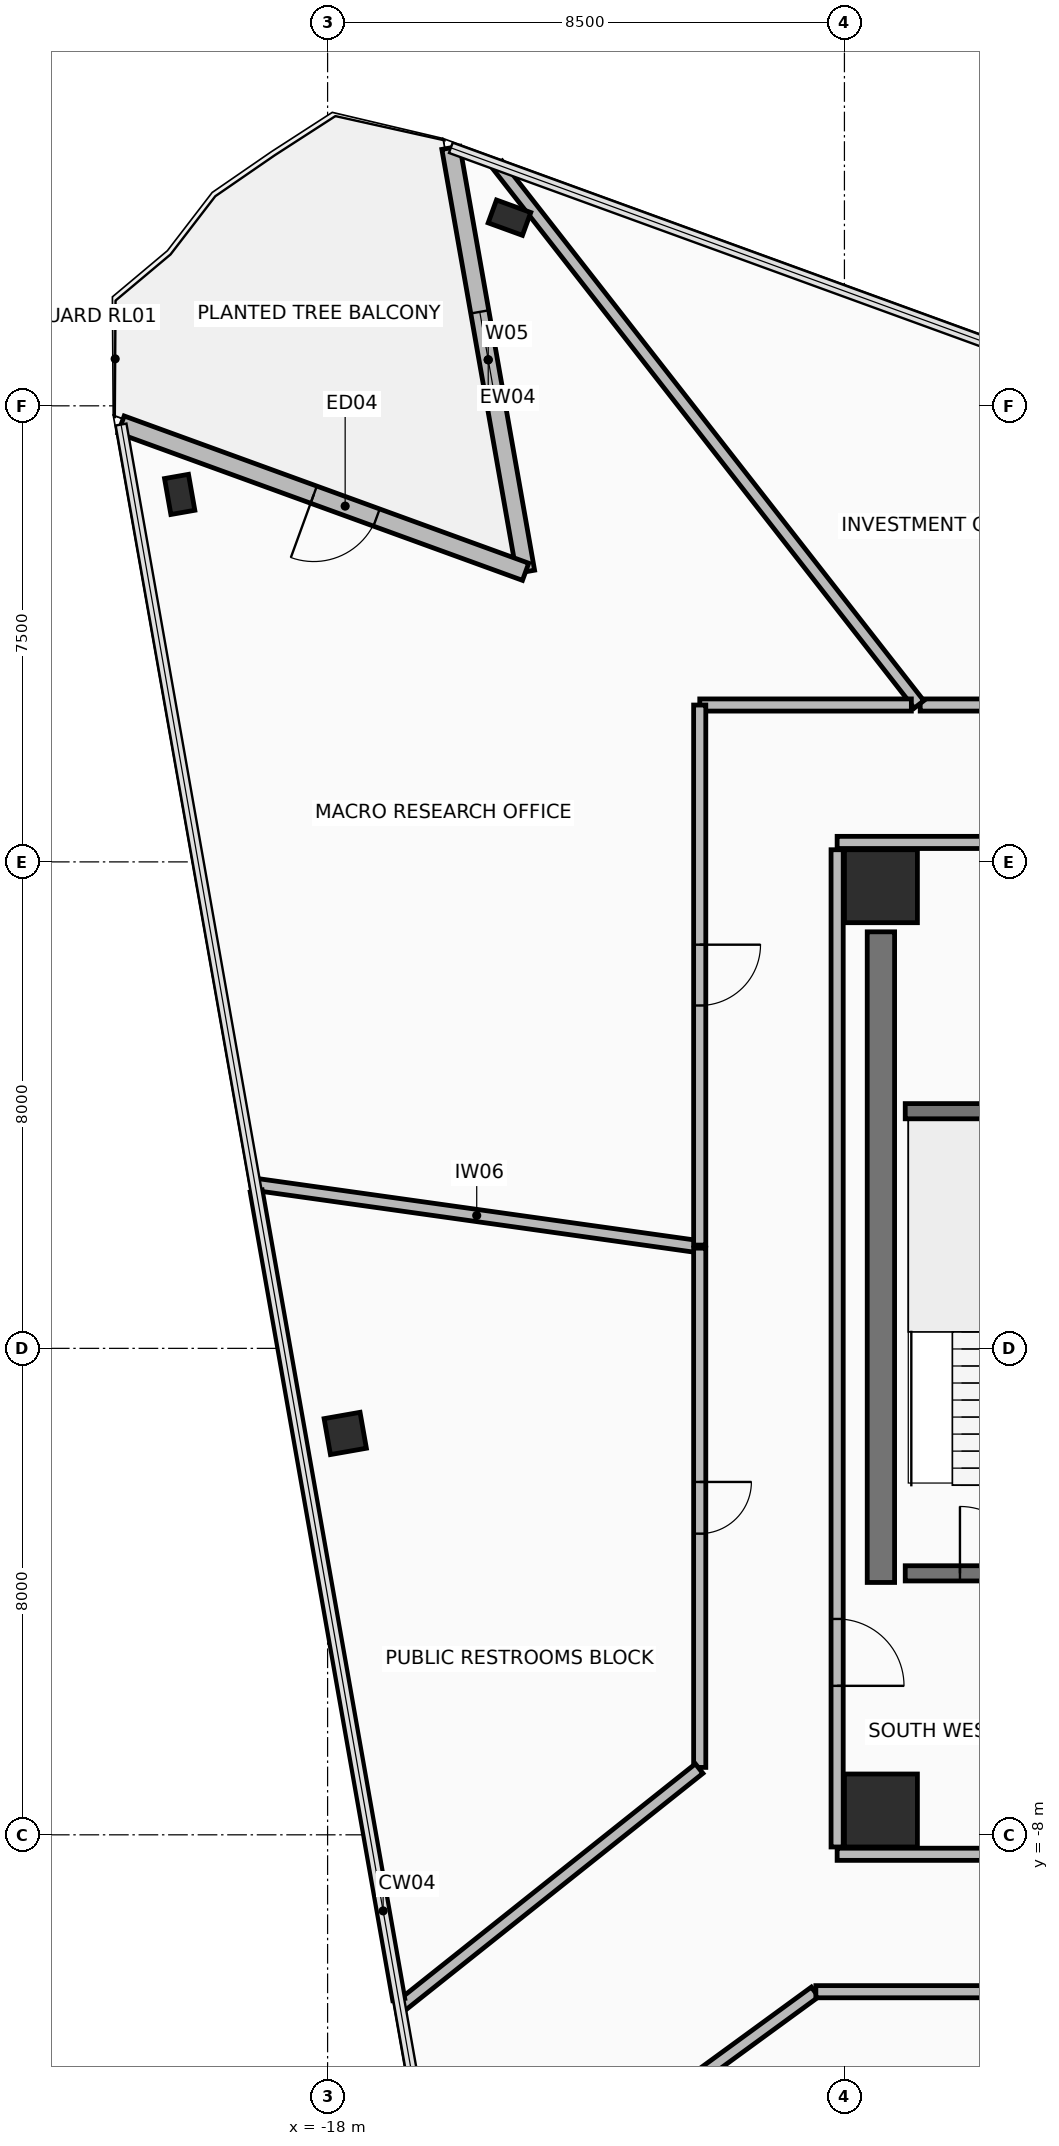
"""IFC4 building model, lengths in metres.
Left out: names, types, materials, properties, quantities, classifications, styles, units other than length and angle.
Written with IfcOpenShell. Run it as: python <this file> out.ifc"""

import sys

from ifc_helpers import new_model, si_unit, direction, frame, frame_2d, origin, origin_2d, place, context, subcontext, project, spatial, rectangle, hollow_rectangle, extrude, element, fill, save


model = new_model("IFC4")
c1 = context("Model", 3, precision=1e-05, world=origin(), true_north=direction((0.0, 1.0)))
c2 = subcontext(c1, "Body", "Model", "MODEL_VIEW")
j1 = project(units=[si_unit("LENGTHUNIT", "METRE"), si_unit("PLANEANGLEUNIT", "RADIAN")], contexts=[c1])
p1 = place(None, origin())
s1 = spatial("IfcSite", under=j1, at=p1, CompositionType="ELEMENT")
p2 = place(p1, origin())
s2 = spatial("IfcBuilding", under=s1, at=p2, CompositionType="ELEMENT")
p3 = place(p2, frame((0.0, 0.0, 170.5)))
s3 = spatial("IfcBuildingStorey", under=s2, at=p3, CompositionType="ELEMENT", Elevation=170.5)
for number, where, z_axis, x_axis in (
    (1, (-8.9, -7.6, 0.0), (0.0, 0.0, 1.0), (1.0, 0.0, 0.0)),
    (2, (-8.9, 7.6, 0.0), (0.0, 0.0, 1.0), (1.0, 0.0, 0.0)),
):
    element("IfcColumn", number, at=place(p3, frame(where, z_axis=z_axis, x_axis=x_axis)), inside=s3, PredefinedType="COLUMN", context=c2, shape_type="SweptSolid", body=[
        extrude(rectangle(XDim=1.2, YDim=1.2, at=origin_2d()), origin(), (0.0, 0.0, 1.0), 3.6),
    ])
p4 = place(p3, frame((-20.433, 14.043, 0.0), z_axis=(0.0, 0.0, 1.0), x_axis=(-0.173648177667, 0.984807753012, 0.0)))
e3 = element("IfcColumn", 3, at=p4, inside=s3, PredefinedType="COLUMN", context=c2, shape_type="SweptSolid", body=[
    extrude(hollow_rectangle(XDim=0.4, YDim=0.6, WallThickness=0.03, at=origin_2d()), origin(), (0.0, 0.0, 1.0), 3.6),
])
p5 = place(p3, frame((-17.71, -1.399, 0.0), z_axis=(0.0, 0.0, 1.0), x_axis=(-0.173648177667, 0.984807753012, 0.0)))
e4 = element("IfcColumn", 4, at=p5, inside=s3, PredefinedType="COLUMN", context=c2, shape_type="SweptSolid", body=[
    extrude(hollow_rectangle(XDim=0.6, YDim=0.6, WallThickness=0.036, at=origin_2d()), origin(), (0.0, 0.0, 1.0), 3.6),
])
p6 = place(p3, frame((-15.009, 18.594, 0.0), z_axis=(0.0, 0.0, 1.0), x_axis=(-0.939692023847, 0.342021783398, 0.0)))
e5 = element("IfcColumn", 5, at=p6, inside=s3, PredefinedType="COLUMN", context=c2, shape_type="SweptSolid", body=[
    extrude(hollow_rectangle(XDim=0.4, YDim=0.6, WallThickness=0.03, at=origin_2d()), origin(), (0.0, 0.0, 1.0), 3.6),
])
p7 = place(p3, frame((-15.973, 19.743, 0.0), z_axis=(0.0, 0.0, 1.0), x_axis=(0.173651569749, -0.984807154891, 0.0)))
e6 = element("IfcWall", 6, at=p7, inside=s3, PredefinedType="STANDARD", context=c2, shape_type="SweptSolid", body=[
    extrude(rectangle(XDim=7.08, YDim=0.3, at=frame_2d((3.54, 0.0))), origin(), (0.0, 0.0, 1.0), 2.715),
])
p8 = place(p7, frame((2.74, 0.0, 0.335)))
e7 = element("IfcOpeningElement", 7, at=p8, cuts=e6, PredefinedType="OPENING", context=c2, shape_type="SweptSolid", body=[
    extrude(rectangle(XDim=1.6, YDim=2.2, at=frame_2d((0.8, 1.1))), frame((0.0, 0.16, 0.0), z_axis=(0.0, -1.0, 0.0), x_axis=(1.0, 0.0, 0.0)), (0.0, 0.0, 1.0), 0.32),
])
p9 = place(p3, frame((-14.744, 12.771, 0.0), z_axis=(0.0, 0.0, 1.0), x_axis=(-0.939687665182, 0.342033758429, 0.0)))
e8 = element("IfcWall", 8, at=p9, inside=s3, PredefinedType="STANDARD", context=c2, shape_type="SweptSolid", body=[
    extrude(rectangle(XDim=7.08, YDim=0.3, at=frame_2d((3.54, 0.0))), origin(), (0.0, 0.0, 1.0), 2.715),
])
p10 = place(p9, frame((2.608, 0.0, 0.0)))
e9 = element("IfcOpeningElement", 9, at=p10, cuts=e8, PredefinedType="OPENING", context=c2, shape_type="SweptSolid", body=[
    extrude(rectangle(XDim=1.1, YDim=2.2, at=frame_2d((0.55, 1.1))), frame((0.0, 0.16, 0.0), z_axis=(0.0, -1.0, 0.0), x_axis=(1.0, 0.0, 0.0)), (0.0, 0.0, 1.0), 0.32),
])
p11 = place(p3, frame((-8.9, -3.85, 0.0), z_axis=(0.0, 0.0, 1.0), x_axis=(0.0, 1.0, 0.0)))
e10 = element("IfcWall", 10, at=p11, inside=s3, PredefinedType="SHEAR", context=c2, shape_type="SweptSolid", body=[
    extrude(rectangle(XDim=10.7, YDim=0.45, at=frame_2d((5.35, 0.0))), origin(), (0.0, 0.0, 1.0), 3.42),
])
p12 = place(p3, frame((-9.62, -8.32, 0.0), z_axis=(0.0, 0.0, 1.0), x_axis=(1.0, 0.0, 0.0)))
e11 = element("IfcWall", 11, at=p12, inside=s3, PredefinedType="PARTITIONING", context=c2, shape_type="SweptSolid", body=[
    extrude(rectangle(XDim=19.24, YDim=0.2, at=frame_2d((9.62, 0.0))), origin(), (0.0, 0.0, 1.0), 2.865),
])
p13 = place(p12, frame((8.57, 0.0, 0.0)))
e12 = element("IfcOpeningElement", 12, at=p13, cuts=e11, PredefinedType="OPENING", context=c2, shape_type="SweptSolid", body=[
    extrude(rectangle(XDim=0.9, YDim=2.1, at=frame_2d((0.45, 1.05))), frame((0.0, 0.11, 0.0), z_axis=(0.0, -1.0, 0.0), x_axis=(1.0, 0.0, 0.0)), (0.0, 0.0, 1.0), 0.22),
])
p14 = place(p12, frame((15.02, 0.0, 0.0)))
e13 = element("IfcOpeningElement", 13, at=p14, cuts=e11, PredefinedType="OPENING", context=c2, shape_type="SweptSolid", body=[
    extrude(rectangle(XDim=0.9, YDim=2.1, at=frame_2d((0.45, 1.05))), frame((0.0, 0.11, 0.0), z_axis=(0.0, -1.0, 0.0), x_axis=(1.0, 0.0, 0.0)), (0.0, 0.0, 1.0), 0.22),
])
p15 = place(p3, frame((9.62, 8.32, 0.0), z_axis=(0.0, 0.0, 1.0), x_axis=(-1.0, 0.0, 0.0)))
e14 = element("IfcWall", 14, at=p15, inside=s3, PredefinedType="PARTITIONING", context=c2, shape_type="SweptSolid", body=[
    extrude(rectangle(XDim=19.24, YDim=0.2, at=frame_2d((9.62, 0.0))), origin(), (0.0, 0.0, 1.0), 2.765),
])
p16 = place(p15, frame((14.22, 0.0, 0.0)))
e15 = element("IfcOpeningElement", 15, at=p16, cuts=e14, PredefinedType="OPENING", context=c2, shape_type="SweptSolid", body=[
    extrude(rectangle(XDim=0.9, YDim=2.1, at=frame_2d((0.45, 1.05))), frame((0.0, 0.11, 0.0), z_axis=(0.0, -1.0, 0.0), x_axis=(1.0, 0.0, 0.0)), (0.0, 0.0, 1.0), 0.22),
])
p17 = place(p3, frame((-9.62, 8.2, 0.0), z_axis=(0.0, 0.0, 1.0), x_axis=(0.0, -1.0, 0.0)))
e16 = element("IfcWall", 16, at=p17, inside=s3, PredefinedType="PARTITIONING", context=c2, shape_type="SweptSolid", body=[
    extrude(rectangle(XDim=16.4, YDim=0.2, at=frame_2d((8.2, 0.0))), origin(), (0.0, 0.0, 1.0), 2.765),
])
p18 = place(p17, frame((12.65, 0.0, 0.0)))
e17 = element("IfcOpeningElement", 17, at=p18, cuts=e16, PredefinedType="OPENING", context=c2, shape_type="SweptSolid", body=[
    extrude(rectangle(XDim=1.1, YDim=2.15, at=frame_2d((0.55, 1.075))), frame((0.0, 0.11, 0.0), z_axis=(0.0, -1.0, 0.0), x_axis=(1.0, 0.0, 0.0)), (0.0, 0.0, 1.0), 0.22),
])
p19 = place(p3, frame((-8.5, -3.7, 0.0), z_axis=(0.0, 0.0, 1.0), x_axis=(1.0, 0.0, 0.0)))
e18 = element("IfcWall", 18, at=p19, inside=s3, PredefinedType="SHEAR", context=c2, shape_type="SweptSolid", body=[
    extrude(rectangle(XDim=2.95, YDim=0.25, at=frame_2d((1.475, 0.0))), origin(), (0.0, 0.0, 1.0), 3.42),
])
p20 = place(p19, frame((0.9, 0.0, 0.0)))
e19 = element("IfcOpeningElement", 19, at=p20, cuts=e18, PredefinedType="OPENING", context=c2, shape_type="SweptSolid", body=[
    extrude(rectangle(XDim=1.1, YDim=2.15, at=frame_2d((0.55, 1.075))), frame((0.0, 0.135, 0.0), z_axis=(0.0, -1.0, 0.0), x_axis=(1.0, 0.0, 0.0)), (0.0, 0.0, 1.0), 0.27),
])
p21 = place(p3, frame((-8.5, 3.9, 0.0), z_axis=(0.0, 0.0, 1.0), x_axis=(1.0, 0.0, 0.0)))
e20 = element("IfcWall", 20, at=p21, inside=s3, PredefinedType="SHEAR", context=c2, shape_type="SweptSolid", body=[
    extrude(rectangle(XDim=2.95, YDim=0.25, at=frame_2d((1.475, 0.0))), origin(), (0.0, 0.0, 1.0), 3.42),
])
p22 = place(p3, frame((-19.194, 2.698, 0.0), z_axis=(0.0, 0.0, 1.0), x_axis=(0.990266577483, -0.139183711406, 0.0)))
e21 = element("IfcWall", 21, at=p22, inside=s3, PredefinedType="PARTITIONING", context=c2, shape_type="SweptSolid", body=[
    extrude(rectangle(XDim=7.364, YDim=0.2, at=frame_2d((3.682, 0.0))), origin(), (0.0, 0.0, 1.0), 2.715),
])
p23 = place(p3, frame((-11.88, 1.648, 0.0), z_axis=(0.0, 0.0, 1.0), x_axis=(0.0, -1.0, 0.0)))
e22 = element("IfcWall", 22, at=p23, inside=s3, PredefinedType="PARTITIONING", context=c2, shape_type="SweptSolid", body=[
    extrude(rectangle(XDim=8.539, YDim=0.2, at=frame_2d((4.27, 0.0))), origin(), (0.0, 0.0, 1.0), 2.865),
])
p24 = place(p23, frame((3.845, 0.0, 0.0)))
e23 = element("IfcOpeningElement", 23, at=p24, cuts=e22, PredefinedType="OPENING", context=c2, shape_type="SweptSolid", body=[
    extrude(rectangle(XDim=0.85, YDim=2.1, at=frame_2d((0.425, 1.05))), frame((0.0, 0.11, 0.0), z_axis=(0.0, -1.0, 0.0), x_axis=(1.0, 0.0, 0.0)), (0.0, 0.0, 1.0), 0.22),
])
p25 = place(p3, frame((-11.889, -6.911, 0.0), z_axis=(0.0, 0.0, 1.0), x_axis=(-0.782381746657, -0.622799167066, 0.0)))
e24 = element("IfcWall", 24, at=p25, inside=s3, PredefinedType="PARTITIONING", context=c2, shape_type="SweptSolid", body=[
    extrude(rectangle(XDim=6.288, YDim=0.2, at=frame_2d((3.144, 0.0))), origin(), (0.0, 0.0, 1.0), 2.715),
])
p26 = place(p3, frame((-16.83, -10.709, 0.0), z_axis=(0.0, 0.0, 1.0), x_axis=(-0.173641964803, 0.984808848487, 0.0)))
e25 = element("IfcWall", 25, at=p26, inside=s3, PredefinedType="PARTITIONING", context=c2, shape_type="SweptSolid", body=[
    extrude(rectangle(XDim=13.503, YDim=0.2, at=frame_2d((6.751, 0.0))), origin(), (0.0, 0.0, 1.0), 3.42),
])
p27 = place(p3, frame((1.09, 10.58, 0.0), z_axis=(0.0, 0.0, 1.0), x_axis=(-1.0, 0.0, 0.0)))
e26 = element("IfcWall", 26, at=p27, inside=s3, PredefinedType="PARTITIONING", context=c2, shape_type="SweptSolid", body=[
    extrude(rectangle(XDim=9.344, YDim=0.2, at=frame_2d((4.672, 0.0))), origin(), (0.0, 0.0, 1.0), 3.055),
])
p28 = place(p27, frame((4.072, 0.0, 0.0)))
e27 = element("IfcOpeningElement", 27, at=p28, cuts=e26, PredefinedType="OPENING", context=c2, shape_type="SweptSolid", body=[
    extrude(rectangle(XDim=1.2, YDim=2.15, at=frame_2d((0.6, 1.075))), frame((0.0, 0.11, 0.0), z_axis=(0.0, -1.0, 0.0), x_axis=(1.0, 0.0, 0.0)), (0.0, 0.0, 1.0), 0.22),
])
p29 = place(p3, frame((-8.273, 10.59, 0.0), z_axis=(0.0, 0.0, 1.0), x_axis=(-0.61567096372, 0.788003340369, 0.0)))
e28 = element("IfcWall", 28, at=p29, inside=s3, PredefinedType="PARTITIONING", context=c2, shape_type="SweptSolid", body=[
    extrude(rectangle(XDim=11.263, YDim=0.2, at=frame_2d((5.631, 0.0))), origin(), (0.0, 0.0, 1.0), 2.715),
])
p30 = place(p3, frame((-8.399, 10.58, 0.0), z_axis=(0.0, 0.0, 1.0), x_axis=(-1.0, 0.0, 0.0)))
e29 = element("IfcWall", 29, at=p30, inside=s3, PredefinedType="PARTITIONING", context=c2, shape_type="SweptSolid", body=[
    extrude(rectangle(XDim=3.48, YDim=0.2, at=frame_2d((1.74, 0.0))), origin(), (0.0, 0.0, 1.0), 2.765),
])
p31 = place(p3, frame((-11.88, 10.579, 0.0), z_axis=(0.0, 0.0, 1.0), x_axis=(0.0, -1.0, 0.0)))
e30 = element("IfcWall", 30, at=p31, inside=s3, PredefinedType="PARTITIONING", context=c2, shape_type="SweptSolid", body=[
    extrude(rectangle(XDim=8.881, YDim=0.2, at=frame_2d((4.44, 0.0))), origin(), (0.0, 0.0, 1.0), 2.765),
])
p32 = place(p31, frame((3.941, 0.0, 0.0)))
e31 = element("IfcOpeningElement", 31, at=p32, cuts=e30, PredefinedType="OPENING", context=c2, shape_type="SweptSolid", body=[
    extrude(rectangle(XDim=1.0, YDim=2.15, at=frame_2d((0.5, 1.075))), frame((0.0, 0.11, 0.0), z_axis=(0.0, -1.0, 0.0), x_axis=(1.0, 0.0, 0.0)), (0.0, 0.0, 1.0), 0.22),
])
p33 = place(p3, frame((-16.069, -15.024, 0.0), z_axis=(0.0, 0.0, 1.0), x_axis=(0.807835167635, 0.589408467815, 0.0)))
e32 = element("IfcWall", 32, at=p33, inside=s3, PredefinedType="PARTITIONING", context=c2, shape_type="SweptSolid", body=[
    extrude(rectangle(XDim=7.531, YDim=0.2, at=frame_2d((3.766, 0.0))), origin(), (0.0, 0.0, 1.0), 2.715),
])
p34 = place(p3, frame((-9.97, -10.58, 0.0), z_axis=(0.0, 0.0, 1.0), x_axis=(1.0, 0.0, 0.0)))
e33 = element("IfcWall", 33, at=p34, inside=s3, PredefinedType="PARTITIONING", context=c2, shape_type="SweptSolid", body=[
    extrude(rectangle(XDim=8.075, YDim=0.2, at=frame_2d((4.037, 0.0))), origin(), (0.0, 0.0, 1.0), 2.865),
])
p35 = place(p34, frame((3.537, 0.0, 0.0)))
e34 = element("IfcOpeningElement", 34, at=p35, cuts=e33, PredefinedType="OPENING", context=c2, shape_type="SweptSolid", body=[
    extrude(rectangle(XDim=1.0, YDim=2.15, at=frame_2d((0.5, 1.075))), frame((0.0, 0.11, 0.0), z_axis=(0.0, -1.0, 0.0), x_axis=(1.0, 0.0, 0.0)), (0.0, 0.0, 1.0), 0.22),
])
p36 = place(p10, frame((1.1, 0.0, 0.0), z_axis=(0.0, 0.0, 1.0), x_axis=(-1.0, 0.0, 0.0)))
e35 = element("IfcDoor", 35, at=p36, inside=s3, OperationType="SINGLE_SWING_LEFT", PredefinedType="DOOR", context=c2, shape_type="SweptSolid", body=[
    extrude(rectangle(XDim=1.1, YDim=2.2, at=frame_2d((0.55, 1.1))), frame((0.0, 0.025, 0.0), z_axis=(0.0, -1.0, 0.0), x_axis=(1.0, 0.0, 0.0)), (0.0, 0.0, 1.0), 0.05),
])
fill(e9, e35)
p37 = place(p8, origin())
e36 = element("IfcWindow", 36, at=p37, inside=s3, PartitioningType="SINGLE_PANEL", PredefinedType="WINDOW", context=c2, shape_type="SweptSolid", body=[
    extrude(rectangle(XDim=1.6, YDim=2.2, at=frame_2d((0.8, 1.1))), frame((0.0, 0.03, 0.0), z_axis=(0.0, -1.0, 0.0), x_axis=(1.0, 0.0, 0.0)), (0.0, 0.0, 1.0), 0.06),
])
fill(e7, e36)
p38 = place(p18, frame((1.1, 0.0, 0.0), z_axis=(0.0, 0.0, 1.0), x_axis=(-1.0, 0.0, 0.0)))
e37 = element("IfcDoor", 37, at=p38, inside=s3, OperationType="SINGLE_SWING_LEFT", PredefinedType="DOOR", context=c2, shape_type="SweptSolid", body=[
    extrude(rectangle(XDim=1.1, YDim=2.15, at=frame_2d((0.55, 1.075))), frame((0.0, 0.025, 0.0), z_axis=(0.0, -1.0, 0.0), x_axis=(1.0, 0.0, 0.0)), (0.0, 0.0, 1.0), 0.05),
])
fill(e17, e37)
p39 = place(p20, origin())
e38 = element("IfcDoor", 38, at=p39, inside=s3, OperationType="SINGLE_SWING_LEFT", PredefinedType="DOOR", context=c2, shape_type="SweptSolid", body=[
    extrude(rectangle(XDim=1.1, YDim=2.15, at=frame_2d((0.55, 1.075))), frame((0.0, 0.025, 0.0), z_axis=(0.0, -1.0, 0.0), x_axis=(1.0, 0.0, 0.0)), (0.0, 0.0, 1.0), 0.05),
])
fill(e19, e38)
p40 = place(p24, origin())
e39 = element("IfcDoor", 39, at=p40, inside=s3, OperationType="SINGLE_SWING_RIGHT", PredefinedType="DOOR", context=c2, shape_type="SweptSolid", body=[
    extrude(rectangle(XDim=0.85, YDim=2.1, at=frame_2d((0.425, 1.05))), frame((0.0, 0.025, 0.0), z_axis=(0.0, -1.0, 0.0), x_axis=(1.0, 0.0, 0.0)), (0.0, 0.0, 1.0), 0.05),
])
fill(e23, e39)
p41 = place(p32, origin())
e40 = element("IfcDoor", 40, at=p41, inside=s3, OperationType="SINGLE_SWING_RIGHT", PredefinedType="DOOR", context=c2, shape_type="SweptSolid", body=[
    extrude(rectangle(XDim=1.0, YDim=2.15, at=frame_2d((0.5, 1.075))), frame((0.0, 0.025, 0.0), z_axis=(0.0, -1.0, 0.0), x_axis=(1.0, 0.0, 0.0)), (0.0, 0.0, 1.0), 0.05),
])
fill(e31, e40)
save(model, sys.argv[1])
